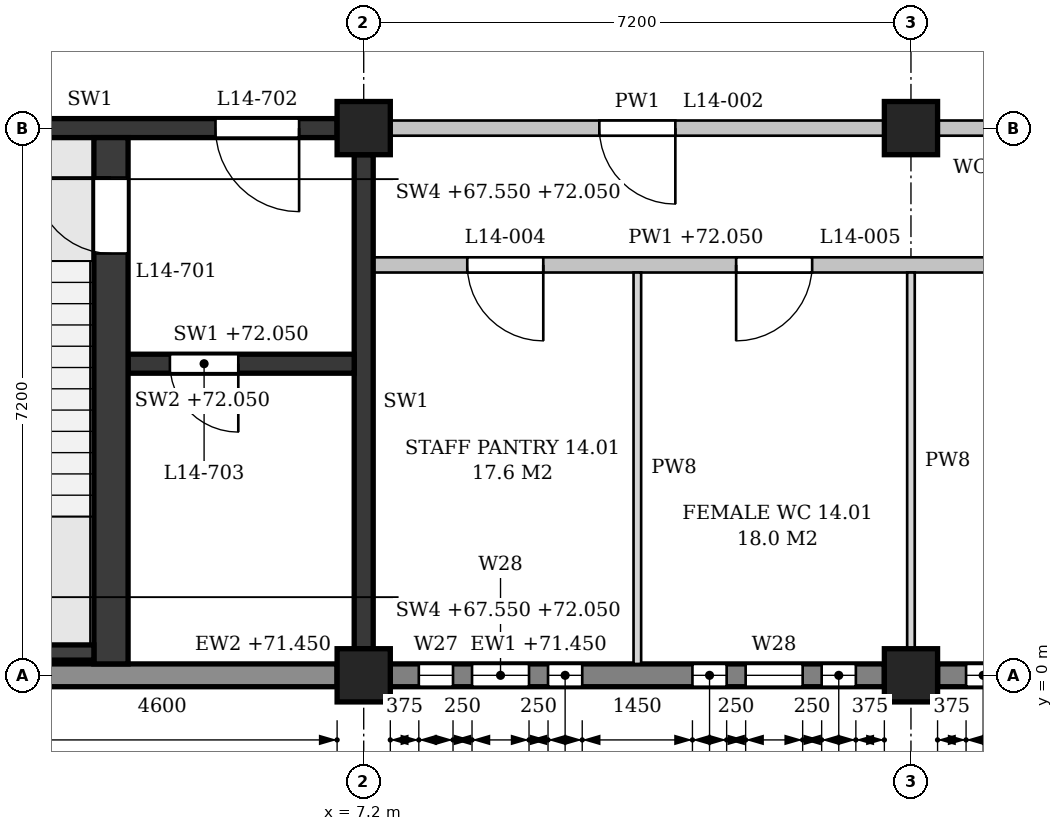
"""IFC4 building model, lengths in metres.
Left out: names, types, materials, properties, quantities, classifications, styles, units other than length and angle.
Written with IfcOpenShell. Run it as: python <this file> out.ifc"""

import sys

from ifc_helpers import new_model, si_unit, direction, frame, frame_2d, origin, origin_2d, place, context, subcontext, project, spatial, polyline, rectangle, outline, extrude, element, fill, save


model = new_model("IFC4")
c1 = context("Model", 3, precision=1e-05, world=origin(), true_north=direction((0.0, 1.0)))
c2 = subcontext(c1, "Body", "Model", "MODEL_VIEW")
j1 = project(units=[si_unit("LENGTHUNIT", "METRE"), si_unit("PLANEANGLEUNIT", "RADIAN")], contexts=[c1])
p1 = place(None, origin())
s1 = spatial("IfcSite", under=j1, at=p1, CompositionType="ELEMENT")
p2 = place(p1, origin())
s2 = spatial("IfcBuilding", under=s1, at=p2, CompositionType="ELEMENT")
p3 = place(p2, frame((0.0, 0.0, 67.8)))
s3 = spatial("IfcBuildingStorey", under=s2, at=p3, CompositionType="ELEMENT", Elevation=67.8)
for number, where, z_axis, x_axis in (
    (1, (7.2, 0.0, 0.0), (0.0, 0.0, 1.0), (1.0, 0.0, 0.0)),
    (2, (7.2, 7.2, 0.0), (0.0, 0.0, 1.0), (1.0, 0.0, 0.0)),
    (3, (14.4, 0.0, 0.0), (0.0, 0.0, 1.0), (1.0, 0.0, 0.0)),
    (4, (14.4, 7.2, 0.0), (0.0, 0.0, 1.0), (1.0, 0.0, 0.0)),
):
    element("IfcColumn", number, at=place(p3, frame(where, z_axis=z_axis, x_axis=x_axis)), inside=s3, PredefinedType="COLUMN", context=c2, shape_type="SweptSolid", body=[
        extrude(rectangle(XDim=0.7, YDim=0.7, at=origin_2d()), origin(), (0.0, 0.0, 1.0), 4.5),
    ])
p4 = place(p3, frame((0.35, 0.0, 0.0), z_axis=(0.0, 0.0, 1.0), x_axis=(1.0, 0.0, 0.0)))
e5 = element("IfcWall", 5, at=p4, inside=s3, PredefinedType="STANDARD", context=c2, shape_type="SweptSolid", body=[
    extrude(rectangle(XDim=6.5, YDim=0.3, at=frame_2d((3.25, 0.0))), origin(), (0.0, 0.0, 1.0), 3.65),
])
p5 = place(p4, frame((1.0, 0.0, 0.9)))
e6 = element("IfcOpeningElement", 6, at=p5, cuts=e5, PredefinedType="OPENING", context=c2, shape_type="SweptSolid", body=[
    extrude(outline(polyline([(0.0, 0.0), (0.9, 0.0), (0.9, 2.25), (0.45, 2.7), (0.0, 2.25), (0.0, 0.0)])), frame((0.0, 0.16, 0.0), z_axis=(0.0, -1.0, 0.0), x_axis=(1.0, 0.0, 0.0)), (0.0, 0.0, 1.0), 0.32),
])
p6 = place(p3, frame((7.55, 0.0, 0.0), z_axis=(0.0, 0.0, 1.0), x_axis=(1.0, 0.0, 0.0)))
e7 = element("IfcWall", 7, at=p6, inside=s3, PredefinedType="STANDARD", context=c2, shape_type="SweptSolid", body=[
    extrude(rectangle(XDim=6.5, YDim=0.3, at=frame_2d((3.25, 0.0))), origin(), (0.0, 0.0, 1.0), 3.65),
])
p7 = place(p6, frame((0.375, 0.0, 1.5)))
e8 = element("IfcOpeningElement", 8, at=p7, cuts=e7, PredefinedType="OPENING", context=c2, shape_type="SweptSolid", body=[
    extrude(outline(polyline([(0.0, 0.0), (0.45, 0.0), (0.45, 1.85), (0.225, 2.1), (0.0, 1.85), (0.0, 0.0)])), frame((0.0, 0.16, 0.0), z_axis=(0.0, -1.0, 0.0), x_axis=(1.0, 0.0, 0.0)), (0.0, 0.0, 1.0), 0.32),
])
p8 = place(p6, frame((1.075, 0.0, 0.9)))
e9 = element("IfcOpeningElement", 9, at=p8, cuts=e7, PredefinedType="OPENING", context=c2, shape_type="SweptSolid", body=[
    extrude(outline(polyline([(0.0, 0.0), (0.75, 0.0), (0.75, 2.25), (0.375, 2.7), (0.0, 2.25), (0.0, 0.0)])), frame((0.0, 0.16, 0.0), z_axis=(0.0, -1.0, 0.0), x_axis=(1.0, 0.0, 0.0)), (0.0, 0.0, 1.0), 0.32),
])
p9 = place(p6, frame((2.075, 0.0, 1.5)))
e10 = element("IfcOpeningElement", 10, at=p9, cuts=e7, PredefinedType="OPENING", context=c2, shape_type="SweptSolid", body=[
    extrude(outline(polyline([(0.0, 0.0), (0.45, 0.0), (0.45, 1.85), (0.225, 2.1), (0.0, 1.85), (0.0, 0.0)])), frame((0.0, 0.16, 0.0), z_axis=(0.0, -1.0, 0.0), x_axis=(1.0, 0.0, 0.0)), (0.0, 0.0, 1.0), 0.32),
])
p10 = place(p6, frame((3.975, 0.0, 1.5)))
e11 = element("IfcOpeningElement", 11, at=p10, cuts=e7, PredefinedType="OPENING", context=c2, shape_type="SweptSolid", body=[
    extrude(outline(polyline([(0.0, 0.0), (0.45, 0.0), (0.45, 1.85), (0.225, 2.1), (0.0, 1.85), (0.0, 0.0)])), frame((0.0, 0.16, 0.0), z_axis=(0.0, -1.0, 0.0), x_axis=(1.0, 0.0, 0.0)), (0.0, 0.0, 1.0), 0.32),
])
p11 = place(p6, frame((4.675, 0.0, 0.9)))
e12 = element("IfcOpeningElement", 12, at=p11, cuts=e7, PredefinedType="OPENING", context=c2, shape_type="SweptSolid", body=[
    extrude(outline(polyline([(0.0, 0.0), (0.75, 0.0), (0.75, 2.25), (0.375, 2.7), (0.0, 2.25), (0.0, 0.0)])), frame((0.0, 0.16, 0.0), z_axis=(0.0, -1.0, 0.0), x_axis=(1.0, 0.0, 0.0)), (0.0, 0.0, 1.0), 0.32),
])
p12 = place(p6, frame((5.675, 0.0, 1.5)))
e13 = element("IfcOpeningElement", 13, at=p12, cuts=e7, PredefinedType="OPENING", context=c2, shape_type="SweptSolid", body=[
    extrude(outline(polyline([(0.0, 0.0), (0.45, 0.0), (0.45, 1.85), (0.225, 2.1), (0.0, 1.85), (0.0, 0.0)])), frame((0.0, 0.16, 0.0), z_axis=(0.0, -1.0, 0.0), x_axis=(1.0, 0.0, 0.0)), (0.0, 0.0, 1.0), 0.32),
])
p13 = place(p3, frame((14.75, 0.0, 0.0), z_axis=(0.0, 0.0, 1.0), x_axis=(1.0, 0.0, 0.0)))
e14 = element("IfcWall", 14, at=p13, inside=s3, PredefinedType="STANDARD", context=c2, shape_type="SweptSolid", body=[
    extrude(rectangle(XDim=6.5, YDim=0.3, at=frame_2d((3.25, 0.0))), origin(), (0.0, 0.0, 1.0), 3.65),
])
p14 = place(p13, frame((0.375, 0.0, 1.5)))
e15 = element("IfcOpeningElement", 15, at=p14, cuts=e14, PredefinedType="OPENING", context=c2, shape_type="SweptSolid", body=[
    extrude(outline(polyline([(0.0, 0.0), (0.45, 0.0), (0.45, 1.85), (0.225, 2.1), (0.0, 1.85), (0.0, 0.0)])), frame((0.0, 0.16, 0.0), z_axis=(0.0, -1.0, 0.0), x_axis=(1.0, 0.0, 0.0)), (0.0, 0.0, 1.0), 0.32),
])
p15 = place(p13, frame((1.075, 0.0, 0.9)))
e16 = element("IfcOpeningElement", 16, at=p15, cuts=e14, PredefinedType="OPENING", context=c2, shape_type="SweptSolid", body=[
    extrude(outline(polyline([(0.0, 0.0), (0.75, 0.0), (0.75, 2.25), (0.375, 2.7), (0.0, 2.25), (0.0, 0.0)])), frame((0.0, 0.16, 0.0), z_axis=(0.0, -1.0, 0.0), x_axis=(1.0, 0.0, 0.0)), (0.0, 0.0, 1.0), 0.32),
])
p16 = place(p13, frame((2.075, 0.0, 1.5)))
e17 = element("IfcOpeningElement", 17, at=p16, cuts=e14, PredefinedType="OPENING", context=c2, shape_type="SweptSolid", body=[
    extrude(outline(polyline([(0.0, 0.0), (0.45, 0.0), (0.45, 1.85), (0.225, 2.1), (0.0, 1.85), (0.0, 0.0)])), frame((0.0, 0.16, 0.0), z_axis=(0.0, -1.0, 0.0), x_axis=(1.0, 0.0, 0.0)), (0.0, 0.0, 1.0), 0.32),
])
p17 = place(p13, frame((3.975, 0.0, 1.5)))
e18 = element("IfcOpeningElement", 18, at=p17, cuts=e14, PredefinedType="OPENING", context=c2, shape_type="SweptSolid", body=[
    extrude(outline(polyline([(0.0, 0.0), (0.45, 0.0), (0.45, 1.85), (0.225, 2.1), (0.0, 1.85), (0.0, 0.0)])), frame((0.0, 0.16, 0.0), z_axis=(0.0, -1.0, 0.0), x_axis=(1.0, 0.0, 0.0)), (0.0, 0.0, 1.0), 0.32),
])
p18 = place(p13, frame((4.675, 0.0, 0.9)))
e19 = element("IfcOpeningElement", 19, at=p18, cuts=e14, PredefinedType="OPENING", context=c2, shape_type="SweptSolid", body=[
    extrude(outline(polyline([(0.0, 0.0), (0.75, 0.0), (0.75, 2.25), (0.375, 2.7), (0.0, 2.25), (0.0, 0.0)])), frame((0.0, 0.16, 0.0), z_axis=(0.0, -1.0, 0.0), x_axis=(1.0, 0.0, 0.0)), (0.0, 0.0, 1.0), 0.32),
])
p19 = place(p13, frame((5.675, 0.0, 1.5)))
e20 = element("IfcOpeningElement", 20, at=p19, cuts=e14, PredefinedType="OPENING", context=c2, shape_type="SweptSolid", body=[
    extrude(outline(polyline([(0.0, 0.0), (0.45, 0.0), (0.45, 1.85), (0.225, 2.1), (0.0, 1.85), (0.0, 0.0)])), frame((0.0, 0.16, 0.0), z_axis=(0.0, -1.0, 0.0), x_axis=(1.0, 0.0, 0.0)), (0.0, 0.0, 1.0), 0.32),
])
p20 = place(p3, frame((0.35, 7.2, 0.0), z_axis=(0.0, 0.0, 1.0), x_axis=(1.0, 0.0, 0.0)))
e21 = element("IfcWall", 21, at=p20, inside=s3, PredefinedType="SHEAR", context=c2, shape_type="SweptSolid", body=[
    extrude(rectangle(XDim=6.5, YDim=0.25, at=frame_2d((3.25, 0.0))), origin(), (0.0, 0.0, 1.0), 3.6),
])
p21 = place(p20, frame((4.9, 0.0, 0.0)))
e22 = element("IfcOpeningElement", 22, at=p21, cuts=e21, PredefinedType="OPENING", context=c2, shape_type="SweptSolid", body=[
    extrude(rectangle(XDim=1.1, YDim=2.1, at=frame_2d((0.55, 1.05))), frame((0.0, 0.135, 0.0), z_axis=(0.0, -1.0, 0.0), x_axis=(1.0, 0.0, 0.0)), (0.0, 0.0, 1.0), 0.27),
])
p22 = place(p3, frame((7.2, 0.35, 0.0), z_axis=(0.0, 0.0, 1.0), x_axis=(0.0, 1.0, 0.0)))
e23 = element("IfcWall", 23, at=p22, inside=s3, PredefinedType="SHEAR", context=c2, shape_type="SweptSolid", body=[
    extrude(rectangle(XDim=6.5, YDim=0.25, at=frame_2d((3.25, 0.0))), origin(), (0.0, 0.0, 1.0), 3.6),
])
p23 = place(p3, frame((2.25, 0.3, -0.25), z_axis=(0.0, 0.0, 1.0), x_axis=(1.0, 0.0, 0.0)))
e24 = element("IfcWall", 24, at=p23, inside=s3, PredefinedType="SHEAR", context=c2, shape_type="SweptSolid", body=[
    extrude(rectangle(XDim=1.4, YDim=0.2, at=frame_2d((0.7, 0.0))), origin(), (0.0, 0.0, 1.0), 4.5),
])
p24 = place(p3, frame((3.875, 0.15, 0.0), z_axis=(0.0, 0.0, 1.0), x_axis=(0.0, 1.0, 0.0)))
e25 = element("IfcWall", 25, at=p24, inside=s3, PredefinedType="SHEAR", context=c2, shape_type="SweptSolid", body=[
    extrude(rectangle(XDim=6.925, YDim=0.45, at=frame_2d((3.462, 0.0))), origin(), (0.0, 0.0, 1.0), 4.25),
])
p25 = place(p24, frame((5.4, 0.0, 0.0)))
e26 = element("IfcOpeningElement", 26, at=p25, cuts=e25, PredefinedType="OPENING", context=c2, shape_type="SweptSolid", body=[
    extrude(rectangle(XDim=1.0, YDim=2.1, at=frame_2d((0.5, 1.05))), frame((0.0, 0.235, 0.0), z_axis=(0.0, -1.0, 0.0), x_axis=(1.0, 0.0, 0.0)), (0.0, 0.0, 1.0), 0.47),
])
p26 = place(p3, frame((4.1, 4.1, 0.0), z_axis=(0.0, 0.0, 1.0), x_axis=(1.0, 0.0, 0.0)))
e27 = element("IfcWall", 27, at=p26, inside=s3, PredefinedType="SHEAR", context=c2, shape_type="SweptSolid", body=[
    extrude(rectangle(XDim=2.975, YDim=0.25, at=frame_2d((1.487, 0.0))), origin(), (0.0, 0.0, 1.0), 4.25),
])
p27 = place(p26, frame((0.55, 0.0, 0.0)))
e28 = element("IfcOpeningElement", 28, at=p27, cuts=e27, PredefinedType="OPENING", context=c2, shape_type="SweptSolid", body=[
    extrude(rectangle(XDim=0.9, YDim=2.1, at=frame_2d((0.45, 1.05))), frame((0.0, 0.135, 0.0), z_axis=(0.0, -1.0, 0.0), x_axis=(1.0, 0.0, 0.0)), (0.0, 0.0, 1.0), 0.27),
])
p28 = place(p3, frame((7.325, 5.4, 0.0), z_axis=(0.0, 0.0, 1.0), x_axis=(1.0, 0.0, 0.0)))
e29 = element("IfcWall", 29, at=p28, inside=s3, PredefinedType="PARTITIONING", context=c2, shape_type="SweptSolid", body=[
    extrude(outline(polyline([(0.0, 0.0), (14.15, 0.0), (14.15, 3.6), (14.075, 3.6), (14.075, 4.25), (7.275, 4.25), (7.275, 3.6), (6.875, 3.6), (6.875, 4.25), (0.075, 4.25), (0.075, 3.6), (0.0, 3.6), (0.0, 0.0)])), frame((0.0, 0.1, 0.0), z_axis=(0.0, -1.0, 0.0), x_axis=(1.0, 0.0, 0.0)), (0.0, 0.0, 1.0), 0.2),
])
p29 = place(p28, frame((1.238, 0.0, 0.0)))
e30 = element("IfcOpeningElement", 30, at=p29, cuts=e29, PredefinedType="OPENING", context=c2, shape_type="SweptSolid", body=[
    extrude(rectangle(XDim=1.0, YDim=2.1, at=frame_2d((0.5, 1.05))), frame((0.0, 0.11, 0.0), z_axis=(0.0, -1.0, 0.0), x_axis=(1.0, 0.0, 0.0)), (0.0, 0.0, 1.0), 0.22),
])
p30 = place(p28, frame((4.775, 0.0, 0.0)))
e31 = element("IfcOpeningElement", 31, at=p30, cuts=e29, PredefinedType="OPENING", context=c2, shape_type="SweptSolid", body=[
    extrude(rectangle(XDim=1.0, YDim=2.1, at=frame_2d((0.5, 1.05))), frame((0.0, 0.11, 0.0), z_axis=(0.0, -1.0, 0.0), x_axis=(1.0, 0.0, 0.0)), (0.0, 0.0, 1.0), 0.22),
])
p31 = place(p28, frame((8.375, 0.0, 0.0)))
e32 = element("IfcOpeningElement", 32, at=p31, cuts=e29, PredefinedType="OPENING", context=c2, shape_type="SweptSolid", body=[
    extrude(rectangle(XDim=1.0, YDim=2.1, at=frame_2d((0.5, 1.05))), frame((0.0, 0.11, 0.0), z_axis=(0.0, -1.0, 0.0), x_axis=(1.0, 0.0, 0.0)), (0.0, 0.0, 1.0), 0.22),
])
p32 = place(p28, frame((11.913, 0.0, 0.0)))
e33 = element("IfcOpeningElement", 33, at=p32, cuts=e29, PredefinedType="OPENING", context=c2, shape_type="SweptSolid", body=[
    extrude(rectangle(XDim=1.0, YDim=2.1, at=frame_2d((0.5, 1.05))), frame((0.0, 0.11, 0.0), z_axis=(0.0, -1.0, 0.0), x_axis=(1.0, 0.0, 0.0)), (0.0, 0.0, 1.0), 0.22),
])
p33 = place(p3, frame((7.55, 7.2, 0.0), z_axis=(0.0, 0.0, 1.0), x_axis=(1.0, 0.0, 0.0)))
e34 = element("IfcWall", 34, at=p33, inside=s3, PredefinedType="PARTITIONING", context=c2, shape_type="SweptSolid", body=[
    extrude(rectangle(XDim=6.5, YDim=0.2, at=frame_2d((3.25, 0.0))), origin(), (0.0, 0.0, 1.0), 3.6),
])
p34 = place(p33, frame((2.75, 0.0, 0.0)))
e35 = element("IfcOpeningElement", 35, at=p34, cuts=e34, PredefinedType="OPENING", context=c2, shape_type="SweptSolid", body=[
    extrude(rectangle(XDim=1.0, YDim=2.1, at=frame_2d((0.5, 1.05))), frame((0.0, 0.11, 0.0), z_axis=(0.0, -1.0, 0.0), x_axis=(1.0, 0.0, 0.0)), (0.0, 0.0, 1.0), 0.22),
])
p35 = place(p3, frame((14.75, 7.2, 0.0), z_axis=(0.0, 0.0, 1.0), x_axis=(1.0, 0.0, 0.0)))
e36 = element("IfcWall", 36, at=p35, inside=s3, PredefinedType="PARTITIONING", context=c2, shape_type="SweptSolid", body=[
    extrude(rectangle(XDim=6.5, YDim=0.2, at=frame_2d((3.25, 0.0))), origin(), (0.0, 0.0, 1.0), 3.6),
])
p36 = place(p35, frame((4.375, 0.0, 0.0)))
e37 = element("IfcOpeningElement", 37, at=p36, cuts=e36, PredefinedType="OPENING", context=c2, shape_type="SweptSolid", body=[
    extrude(rectangle(XDim=1.0, YDim=2.1, at=frame_2d((0.5, 1.05))), frame((0.0, 0.11, 0.0), z_axis=(0.0, -1.0, 0.0), x_axis=(1.0, 0.0, 0.0)), (0.0, 0.0, 1.0), 0.22),
])
p37 = place(p3, frame((10.8, 0.15, 0.0), z_axis=(0.0, 0.0, 1.0), x_axis=(0.0, 1.0, 0.0)))
e38 = element("IfcWall", 38, at=p37, inside=s3, PredefinedType="PARTITIONING", context=c2, shape_type="SweptSolid", body=[
    extrude(rectangle(XDim=5.15, YDim=0.1, at=frame_2d((2.575, 0.0))), origin(), (0.0, 0.0, 1.0), 3.6),
])
p38 = place(p3, frame((14.4, 0.35, 0.0), z_axis=(0.0, 0.0, 1.0), x_axis=(0.0, 1.0, 0.0)))
e39 = element("IfcWall", 39, at=p38, inside=s3, PredefinedType="PARTITIONING", context=c2, shape_type="SweptSolid", body=[
    extrude(rectangle(XDim=4.95, YDim=0.1, at=frame_2d((2.475, 0.0))), origin(), (0.0, 0.0, 1.0), 3.6),
])
p39 = place(p7, origin())
e40 = element("IfcWindow", 40, at=p39, inside=s3, PartitioningType="SINGLE_PANEL", PredefinedType="WINDOW", context=c2, shape_type="SweptSolid", body=[
    extrude(outline(polyline([(0.0, 0.0), (0.45, 0.0), (0.45, 1.85), (0.225, 2.1), (0.0, 1.85), (0.0, 0.0)])), frame((0.0, 0.03, 0.0), z_axis=(0.0, -1.0, 0.0), x_axis=(1.0, 0.0, 0.0)), (0.0, 0.0, 1.0), 0.06),
])
fill(e8, e40)
p40 = place(p8, origin())
e41 = element("IfcWindow", 41, at=p40, inside=s3, PartitioningType="SINGLE_PANEL", PredefinedType="WINDOW", context=c2, shape_type="SweptSolid", body=[
    extrude(outline(polyline([(0.0, 0.0), (0.75, 0.0), (0.75, 2.25), (0.375, 2.7), (0.0, 2.25), (0.0, 0.0)])), frame((0.0, 0.03, 0.0), z_axis=(0.0, -1.0, 0.0), x_axis=(1.0, 0.0, 0.0)), (0.0, 0.0, 1.0), 0.06),
])
fill(e9, e41)
p41 = place(p9, origin())
e42 = element("IfcWindow", 42, at=p41, inside=s3, PartitioningType="SINGLE_PANEL", PredefinedType="WINDOW", context=c2, shape_type="SweptSolid", body=[
    extrude(outline(polyline([(0.0, 0.0), (0.45, 0.0), (0.45, 1.85), (0.225, 2.1), (0.0, 1.85), (0.0, 0.0)])), frame((0.0, 0.03, 0.0), z_axis=(0.0, -1.0, 0.0), x_axis=(1.0, 0.0, 0.0)), (0.0, 0.0, 1.0), 0.06),
])
fill(e10, e42)
p42 = place(p10, origin())
e43 = element("IfcWindow", 43, at=p42, inside=s3, PartitioningType="SINGLE_PANEL", PredefinedType="WINDOW", context=c2, shape_type="SweptSolid", body=[
    extrude(outline(polyline([(0.0, 0.0), (0.45, 0.0), (0.45, 1.85), (0.225, 2.1), (0.0, 1.85), (0.0, 0.0)])), frame((0.0, 0.03, 0.0), z_axis=(0.0, -1.0, 0.0), x_axis=(1.0, 0.0, 0.0)), (0.0, 0.0, 1.0), 0.06),
])
fill(e11, e43)
p43 = place(p11, origin())
e44 = element("IfcWindow", 44, at=p43, inside=s3, PartitioningType="SINGLE_PANEL", PredefinedType="WINDOW", context=c2, shape_type="SweptSolid", body=[
    extrude(outline(polyline([(0.0, 0.0), (0.75, 0.0), (0.75, 2.25), (0.375, 2.7), (0.0, 2.25), (0.0, 0.0)])), frame((0.0, 0.03, 0.0), z_axis=(0.0, -1.0, 0.0), x_axis=(1.0, 0.0, 0.0)), (0.0, 0.0, 1.0), 0.06),
])
fill(e12, e44)
p44 = place(p12, origin())
e45 = element("IfcWindow", 45, at=p44, inside=s3, PartitioningType="SINGLE_PANEL", PredefinedType="WINDOW", context=c2, shape_type="SweptSolid", body=[
    extrude(outline(polyline([(0.0, 0.0), (0.45, 0.0), (0.45, 1.85), (0.225, 2.1), (0.0, 1.85), (0.0, 0.0)])), frame((0.0, 0.03, 0.0), z_axis=(0.0, -1.0, 0.0), x_axis=(1.0, 0.0, 0.0)), (0.0, 0.0, 1.0), 0.06),
])
fill(e13, e45)
p45 = place(p14, origin())
e46 = element("IfcWindow", 46, at=p45, inside=s3, PartitioningType="SINGLE_PANEL", PredefinedType="WINDOW", context=c2, shape_type="SweptSolid", body=[
    extrude(outline(polyline([(0.0, 0.0), (0.45, 0.0), (0.45, 1.85), (0.225, 2.1), (0.0, 1.85), (0.0, 0.0)])), frame((0.0, 0.03, 0.0), z_axis=(0.0, -1.0, 0.0), x_axis=(1.0, 0.0, 0.0)), (0.0, 0.0, 1.0), 0.06),
])
fill(e15, e46)
p46 = place(p25, origin())
e47 = element("IfcDoor", 47, at=p46, inside=s3, OperationType="SINGLE_SWING_RIGHT", PredefinedType="DOOR", context=c2, shape_type="SweptSolid", body=[
    extrude(rectangle(XDim=1.0, YDim=2.1, at=frame_2d((0.5, 1.05))), frame((0.0, 0.025, 0.0), z_axis=(0.0, -1.0, 0.0), x_axis=(1.0, 0.0, 0.0)), (0.0, 0.0, 1.0), 0.05),
])
fill(e26, e47)
p47 = place(p21, frame((1.1, 0.0, 0.0), z_axis=(0.0, 0.0, 1.0), x_axis=(-1.0, 0.0, 0.0)))
e48 = element("IfcDoor", 48, at=p47, inside=s3, OperationType="SINGLE_SWING_LEFT", PredefinedType="DOOR", context=c2, shape_type="SweptSolid", body=[
    extrude(rectangle(XDim=1.1, YDim=2.1, at=frame_2d((0.55, 1.05))), frame((0.0, 0.025, 0.0), z_axis=(0.0, -1.0, 0.0), x_axis=(1.0, 0.0, 0.0)), (0.0, 0.0, 1.0), 0.05),
])
fill(e22, e48)
p48 = place(p27, frame((0.9, 0.0, 0.0), z_axis=(0.0, 0.0, 1.0), x_axis=(-1.0, 0.0, 0.0)))
e49 = element("IfcDoor", 49, at=p48, inside=s3, OperationType="SINGLE_SWING_LEFT", PredefinedType="DOOR", context=c2, shape_type="SweptSolid", body=[
    extrude(rectangle(XDim=0.9, YDim=2.1, at=frame_2d((0.45, 1.05))), frame((0.0, 0.025, 0.0), z_axis=(0.0, -1.0, 0.0), x_axis=(1.0, 0.0, 0.0)), (0.0, 0.0, 1.0), 0.05),
])
fill(e28, e49)
p49 = place(p34, frame((1.0, 0.0, 0.0), z_axis=(0.0, 0.0, 1.0), x_axis=(-1.0, 0.0, 0.0)))
e50 = element("IfcDoor", 50, at=p49, inside=s3, OperationType="SINGLE_SWING_LEFT", PredefinedType="DOOR", context=c2, shape_type="SweptSolid", body=[
    extrude(rectangle(XDim=1.0, YDim=2.1, at=frame_2d((0.5, 1.05))), frame((0.0, 0.025, 0.0), z_axis=(0.0, -1.0, 0.0), x_axis=(1.0, 0.0, 0.0)), (0.0, 0.0, 1.0), 0.05),
])
fill(e35, e50)
p50 = place(p29, frame((1.0, 0.0, 0.0), z_axis=(0.0, 0.0, 1.0), x_axis=(-1.0, 0.0, 0.0)))
e51 = element("IfcDoor", 51, at=p50, inside=s3, OperationType="SINGLE_SWING_LEFT", PredefinedType="DOOR", context=c2, shape_type="SweptSolid", body=[
    extrude(rectangle(XDim=1.0, YDim=2.1, at=frame_2d((0.5, 1.05))), frame((0.0, 0.025, 0.0), z_axis=(0.0, -1.0, 0.0), x_axis=(1.0, 0.0, 0.0)), (0.0, 0.0, 1.0), 0.05),
])
fill(e30, e51)
p51 = place(p30, frame((1.0, 0.0, 0.0), z_axis=(0.0, 0.0, 1.0), x_axis=(-1.0, 0.0, 0.0)))
e52 = element("IfcDoor", 52, at=p51, inside=s3, OperationType="SINGLE_SWING_RIGHT", PredefinedType="DOOR", context=c2, shape_type="SweptSolid", body=[
    extrude(rectangle(XDim=1.0, YDim=2.1, at=frame_2d((0.5, 1.05))), frame((0.0, 0.025, 0.0), z_axis=(0.0, -1.0, 0.0), x_axis=(1.0, 0.0, 0.0)), (0.0, 0.0, 1.0), 0.05),
])
fill(e31, e52)
save(model, sys.argv[1])
